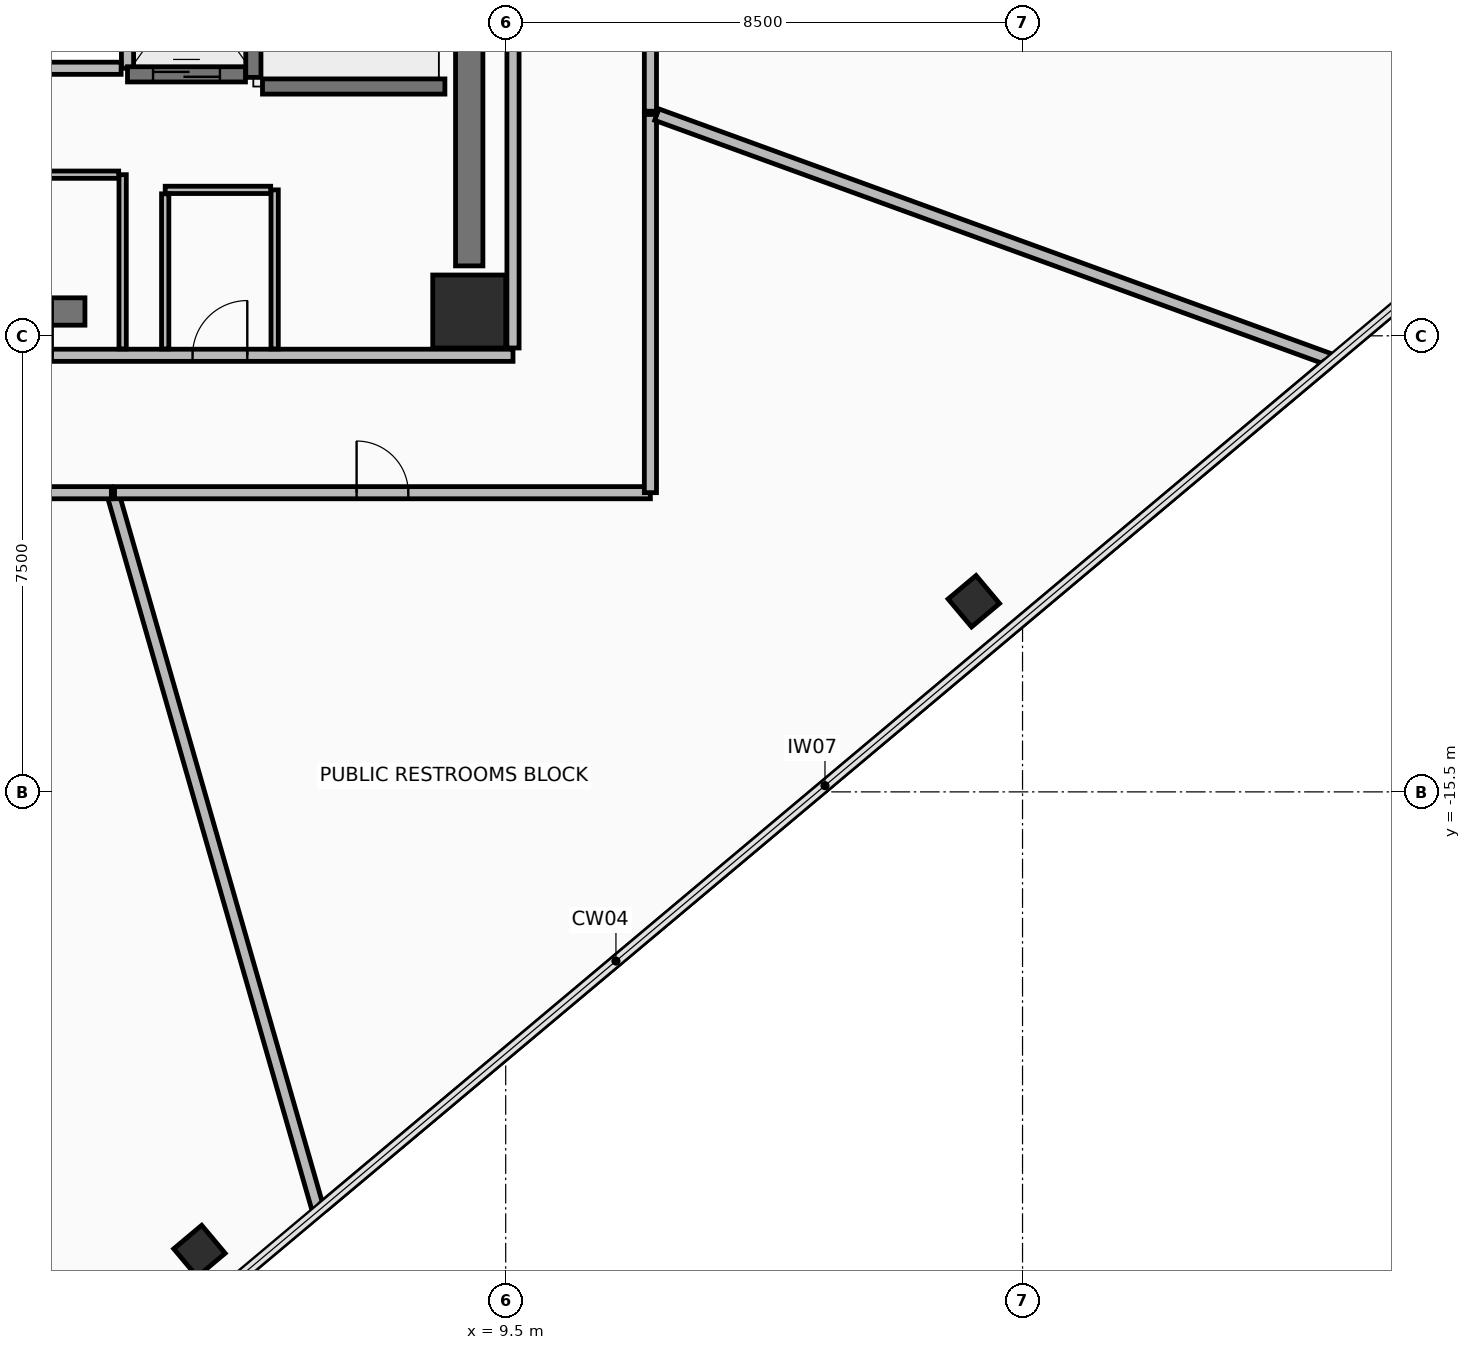
"""IFC4 building model, lengths in metres.
Left out: names, types, materials, properties, quantities, classifications, styles, units other than length and angle.
Written with IfcOpenShell. Run it as: python <this file> out.ifc"""

import sys

from ifc_helpers import new_model, si_unit, direction, frame, frame_2d, origin, origin_2d, place, context, subcontext, project, spatial, rectangle, hollow_rectangle, extrude, element, fill, save


model = new_model("IFC4")
c1 = context("Model", 3, precision=1e-05, world=origin(), true_north=direction((0.0, 1.0)))
c2 = subcontext(c1, "Body", "Model", "MODEL_VIEW")
j1 = project(units=[si_unit("LENGTHUNIT", "METRE"), si_unit("PLANEANGLEUNIT", "RADIAN")], contexts=[c1])
p1 = place(None, origin())
s1 = spatial("IfcSite", under=j1, at=p1, CompositionType="ELEMENT")
p2 = place(p1, origin())
s2 = spatial("IfcBuilding", under=s1, at=p2, CompositionType="ELEMENT")
p3 = place(p2, frame((0.0, 0.0, 188.5)))
s3 = spatial("IfcBuildingStorey", under=s2, at=p3, CompositionType="ELEMENT", Elevation=188.5)
p4 = place(p3, frame((8.9, -7.6, 0.0), z_axis=(0.0, 0.0, 1.0), x_axis=(1.0, 0.0, 0.0)))
e1 = element("IfcColumn", 1, at=p4, inside=s3, PredefinedType="COLUMN", context=c2, shape_type="SweptSolid", body=[
    extrude(rectangle(XDim=1.2, YDim=1.2, at=origin_2d()), origin(), (0.0, 0.0, 1.0), 3.6),
])
for number, where, z_axis, x_axis in (
    (2, (4.463, -23.051, 0.0), (0.0, 0.0, 1.0), (0.766, 0.643, 0.0)),
    (3, (17.198, -12.365, 0.0), (0.0, 0.0, 1.0), (0.766, 0.643, 0.0)),
):
    element("IfcColumn", number, at=place(p3, frame(where, z_axis=z_axis, x_axis=x_axis)), inside=s3, PredefinedType="COLUMN", context=c2, shape_type="SweptSolid", body=[
        extrude(hollow_rectangle(XDim=0.6, YDim=0.6, WallThickness=0.036, at=origin_2d()), origin(), (0.0, 0.0, 1.0), 3.6),
    ])
p5 = place(p3, frame((-2.8, -7.6, 0.0), z_axis=(0.0, 0.0, 1.0), x_axis=(1.0, 0.0, 0.0)))
e4 = element("IfcWall", 4, at=p5, inside=s3, PredefinedType="SHEAR", context=c2, shape_type="SweptSolid", body=[
    extrude(rectangle(XDim=5.38, YDim=0.45, at=frame_2d((2.69, 0.0))), origin(), (0.0, 0.0, 1.0), 3.42),
])
p6 = place(p3, frame((8.9, -6.85, 0.0), z_axis=(0.0, 0.0, 1.0), x_axis=(0.0, 1.0, 0.0)))
e5 = element("IfcWall", 5, at=p6, inside=s3, PredefinedType="SHEAR", context=c2, shape_type="SweptSolid", body=[
    extrude(rectangle(XDim=10.7, YDim=0.45, at=frame_2d((5.35, 0.0))), origin(), (0.0, 0.0, 1.0), 3.42),
])
p7 = place(p3, frame((-9.62, -8.32, 0.0), z_axis=(0.0, 0.0, 1.0), x_axis=(1.0, 0.0, 0.0)))
e6 = element("IfcWall", 6, at=p7, inside=s3, PredefinedType="PARTITIONING", context=c2, shape_type="SweptSolid", body=[
    extrude(rectangle(XDim=19.24, YDim=0.2, at=frame_2d((9.62, 0.0))), origin(), (0.0, 0.0, 1.0), 2.865),
])
p8 = place(p7, frame((7.37, 0.0, 0.0)))
e7 = element("IfcOpeningElement", 7, at=p8, cuts=e6, PredefinedType="OPENING", context=c2, shape_type="SweptSolid", body=[
    extrude(rectangle(XDim=0.9, YDim=2.1, at=frame_2d((0.45, 1.05))), frame((0.0, 0.11, 0.0), z_axis=(0.0, -1.0, 0.0), x_axis=(1.0, 0.0, 0.0)), (0.0, 0.0, 1.0), 0.22),
])
p9 = place(p7, frame((10.77, 0.0, 0.0)))
e8 = element("IfcOpeningElement", 8, at=p9, cuts=e6, PredefinedType="OPENING", context=c2, shape_type="SweptSolid", body=[
    extrude(rectangle(XDim=0.9, YDim=2.1, at=frame_2d((0.45, 1.05))), frame((0.0, 0.11, 0.0), z_axis=(0.0, -1.0, 0.0), x_axis=(1.0, 0.0, 0.0)), (0.0, 0.0, 1.0), 0.22),
])
p10 = place(p7, frame((13.97, 0.0, 0.0)))
e9 = element("IfcOpeningElement", 9, at=p10, cuts=e6, PredefinedType="OPENING", context=c2, shape_type="SweptSolid", body=[
    extrude(rectangle(XDim=0.9, YDim=2.1, at=frame_2d((0.45, 1.05))), frame((0.0, 0.11, 0.0), z_axis=(0.0, -1.0, 0.0), x_axis=(1.0, 0.0, 0.0)), (0.0, 0.0, 1.0), 0.22),
])
p11 = place(p3, frame((9.62, -8.2, 0.0), z_axis=(0.0, 0.0, 1.0), x_axis=(0.0, 1.0, 0.0)))
e10 = element("IfcWall", 10, at=p11, inside=s3, PredefinedType="PARTITIONING", context=c2, shape_type="SweptSolid", body=[
    extrude(rectangle(XDim=16.4, YDim=0.2, at=frame_2d((8.2, 0.0))), origin(), (0.0, 0.0, 1.0), 2.865),
])
p12 = place(p11, frame((12.65, 0.0, 0.0)))
e11 = element("IfcOpeningElement", 11, at=p12, cuts=e10, PredefinedType="OPENING", context=c2, shape_type="SweptSolid", body=[
    extrude(rectangle(XDim=1.1, YDim=2.15, at=frame_2d((0.55, 1.075))), frame((0.0, 0.11, 0.0), z_axis=(0.0, -1.0, 0.0), x_axis=(1.0, 0.0, 0.0)), (0.0, 0.0, 1.0), 0.22),
])
p13 = place(p3, frame((5.35, -3.75, 0.0), z_axis=(0.0, 0.0, 1.0), x_axis=(0.0, 1.0, 0.0)))
e12 = element("IfcWall", 12, at=p13, inside=s3, PredefinedType="SHEAR", context=c2, shape_type="SweptSolid", body=[
    extrude(rectangle(XDim=7.3, YDim=0.25, at=frame_2d((3.65, 0.0))), origin(), (0.0, 0.0, 1.0), 3.42),
])
p14 = place(p3, frame((5.5, -3.9, 0.0), z_axis=(0.0, 0.0, 1.0), x_axis=(1.0, 0.0, 0.0)))
e13 = element("IfcWall", 13, at=p14, inside=s3, PredefinedType="SHEAR", context=c2, shape_type="SweptSolid", body=[
    extrude(rectangle(XDim=3.0, YDim=0.25, at=frame_2d((1.5, 0.0))), origin(), (0.0, 0.0, 1.0), 3.42),
])
p15 = place(p3, frame((3.28, -3.6, 0.0), z_axis=(0.0, 0.0, 1.0), x_axis=(0.0, 1.0, 0.0)))
e14 = element("IfcWall", 14, at=p15, inside=s3, PredefinedType="PARTITIONING", context=c2, shape_type="SweptSolid", body=[
    extrude(rectangle(XDim=1.8, YDim=0.2, at=frame_2d((0.9, 0.0))), origin(), (0.0, 0.0, 1.0), 3.42),
])
p16 = place(p3, frame((1.13, -3.6, 0.0), z_axis=(0.0, 0.0, 1.0), x_axis=(1.0, 0.0, 0.0)))
e15 = element("IfcWall", 15, at=p16, inside=s3, PredefinedType="PARTITIONING", context=c2, shape_type="SweptSolid", body=[
    extrude(rectangle(XDim=2.045, YDim=0.2, at=frame_2d((1.022, 0.0))), origin(), (0.0, 0.0, 1.0), 3.42),
])
p17 = place(p3, frame((3.28, -3.7, 0.0), z_axis=(0.0, 0.0, 1.0), x_axis=(1.0, 0.0, 0.0)))
e16 = element("IfcWall", 16, at=p17, inside=s3, PredefinedType="SHEAR", context=c2, shape_type="SweptSolid", body=[
    extrude(rectangle(XDim=1.94, YDim=0.25, at=frame_2d((0.97, 0.0))), origin(), (0.0, 0.0, 1.0), 3.42),
])
p18 = place(p17, frame((0.42, 0.0, 0.0)))
e17 = element("IfcOpeningElement", 17, at=p18, cuts=e16, PredefinedType="OPENING", context=c2, shape_type="SweptSolid", body=[
    extrude(rectangle(XDim=1.1, YDim=2.2, at=frame_2d((0.55, 1.1))), frame((0.0, 0.135, 0.0), z_axis=(0.0, -1.0, 0.0), x_axis=(1.0, 0.0, 0.0)), (0.0, 0.0, 1.0), 0.27),
])
p19 = place(p3, frame((3.2, -8.215, 0.0), z_axis=(0.0, 0.0, 1.0), x_axis=(0.0, 1.0, 0.0)))
e18 = element("IfcWall", 18, at=p19, inside=s3, PredefinedType="PARTITIONING", context=c2, shape_type="SweptSolid", body=[
    extrude(rectangle(XDim=2.865, YDim=0.12, at=frame_2d((1.433, 0.0))), origin(), (0.0, 0.0, 1.0), 2.715),
])
p20 = place(p3, frame((3.135, -5.35, 0.0), z_axis=(0.0, 0.0, 1.0), x_axis=(-1.0, 0.0, 0.0)))
e19 = element("IfcWall", 19, at=p20, inside=s3, PredefinedType="PARTITIONING", context=c2, shape_type="SweptSolid", body=[
    extrude(rectangle(XDim=3.135, YDim=0.12, at=frame_2d((1.567, 0.0))), origin(), (0.0, 0.0, 1.0), 3.42),
])
p21 = place(p3, frame((5.7, -8.215, 0.0), z_axis=(0.0, 0.0, 1.0), x_axis=(0.0, 1.0, 0.0)))
e20 = element("IfcWall", 20, at=p21, inside=s3, PredefinedType="PARTITIONING", context=c2, shape_type="SweptSolid", body=[
    extrude(rectangle(XDim=2.615, YDim=0.12, at=frame_2d((1.308, 0.0))), origin(), (0.0, 0.0, 1.0), 2.715),
])
p22 = place(p3, frame((5.635, -5.6, 0.0), z_axis=(0.0, 0.0, 1.0), x_axis=(-1.0, 0.0, 0.0)))
e21 = element("IfcWall", 21, at=p22, inside=s3, PredefinedType="PARTITIONING", context=c2, shape_type="SweptSolid", body=[
    extrude(rectangle(XDim=1.735, YDim=0.12, at=frame_2d((0.868, 0.0))), origin(), (0.0, 0.0, 1.0), 3.42),
])
p23 = place(p3, frame((3.9, -5.665, 0.0), z_axis=(0.0, 0.0, 1.0), x_axis=(0.0, -1.0, 0.0)))
e22 = element("IfcWall", 22, at=p23, inside=s3, PredefinedType="PARTITIONING", context=c2, shape_type="SweptSolid", body=[
    extrude(rectangle(XDim=2.55, YDim=0.12, at=frame_2d((1.275, 0.0))), origin(), (0.0, 0.0, 1.0), 2.715),
])
p24 = place(p3, frame((6.42, -22.388, 0.0), z_axis=(0.0, 0.0, 1.0), x_axis=(-0.275623781544, 0.961265588195, 0.0)))
e23 = element("IfcWall", 23, at=p24, inside=s3, PredefinedType="PARTITIONING", context=c2, shape_type="SweptSolid", body=[
    extrude(rectangle(XDim=12.251, YDim=0.2, at=frame_2d((6.125, 0.0))), origin(), (0.0, 0.0, 1.0), 2.715),
])
p25 = place(p3, frame((3.067, -10.58, 0.0), z_axis=(0.0, 0.0, 1.0), x_axis=(1.0, 0.0, 0.0)))
e24 = element("IfcWall", 24, at=p25, inside=s3, PredefinedType="PARTITIONING", context=c2, shape_type="SweptSolid", body=[
    extrude(rectangle(XDim=8.812, YDim=0.2, at=frame_2d((4.406, 0.0))), origin(), (0.0, 0.0, 1.0), 2.865),
])
p26 = place(p25, frame((3.981, 0.0, 0.0)))
e25 = element("IfcOpeningElement", 25, at=p26, cuts=e24, PredefinedType="OPENING", context=c2, shape_type="SweptSolid", body=[
    extrude(rectangle(XDim=0.85, YDim=2.1, at=frame_2d((0.425, 1.05))), frame((0.0, 0.11, 0.0), z_axis=(0.0, -1.0, 0.0), x_axis=(1.0, 0.0, 0.0)), (0.0, 0.0, 1.0), 0.22),
])
p27 = place(p3, frame((11.88, -10.579, 0.0), z_axis=(0.0, 0.0, 1.0), x_axis=(0.0, 1.0, 0.0)))
e26 = element("IfcWall", 26, at=p27, inside=s3, PredefinedType="PARTITIONING", context=c2, shape_type="SweptSolid", body=[
    extrude(rectangle(XDim=6.22, YDim=0.2, at=frame_2d((3.11, 0.0))), origin(), (0.0, 0.0, 1.0), 2.865),
])
p28 = place(p3, frame((11.985, -4.362, 0.0), z_axis=(0.0, 0.0, 1.0), x_axis=(0.939698056563, -0.34200520828, 0.0)))
e27 = element("IfcWall", 27, at=p28, inside=s3, PredefinedType="PARTITIONING", context=c2, shape_type="SweptSolid", body=[
    extrude(rectangle(XDim=11.814, YDim=0.2, at=frame_2d((5.907, 0.0))), origin(), (0.0, 0.0, 1.0), 2.715),
])
p29 = place(p3, frame((22.994, -8.481, 0.0), z_axis=(0.0, 0.0, 1.0), x_axis=(-0.766042878482, -0.642789474343, 0.0)))
e28 = element("IfcWall", 28, at=p29, inside=s3, PredefinedType="PARTITIONING", context=c2, shape_type="SweptSolid", body=[
    extrude(rectangle(XDim=21.521, YDim=0.15, at=frame_2d((10.761, 0.0))), origin(), (0.0, 0.0, 1.0), 3.42),
])
p30 = place(p3, frame((-8.254, -10.58, 0.0), z_axis=(0.0, 0.0, 1.0), x_axis=(1.0, 0.0, 0.0)))
e29 = element("IfcWall", 29, at=p30, inside=s3, PredefinedType="PARTITIONING", context=c2, shape_type="SweptSolid", body=[
    extrude(rectangle(XDim=11.269, YDim=0.2, at=frame_2d((5.634, 0.0))), origin(), (0.0, 0.0, 1.0), 3.42),
])
p31 = place(p30, frame((5.134, 0.0, 0.0)))
e30 = element("IfcOpeningElement", 30, at=p31, cuts=e29, PredefinedType="OPENING", context=c2, shape_type="SweptSolid", body=[
    extrude(rectangle(XDim=1.0, YDim=2.15, at=frame_2d((0.5, 1.075))), frame((0.0, 0.11, 0.0), z_axis=(0.0, -1.0, 0.0), x_axis=(1.0, 0.0, 0.0)), (0.0, 0.0, 1.0), 0.22),
])
p32 = place(p3, frame((11.88, -4.306, 0.0), z_axis=(0.0, 0.0, 1.0), x_axis=(0.0, 1.0, 0.0)))
e31 = element("IfcWall", 31, at=p32, inside=s3, PredefinedType="PARTITIONING", context=c2, shape_type="SweptSolid", body=[
    extrude(rectangle(XDim=9.83, YDim=0.2, at=frame_2d((4.915, 0.0))), origin(), (0.0, 0.0, 1.0), 3.42),
])
p33 = place(p32, frame((4.465, 0.0, 0.0)))
e32 = element("IfcOpeningElement", 32, at=p33, cuts=e31, PredefinedType="OPENING", context=c2, shape_type="SweptSolid", body=[
    extrude(rectangle(XDim=0.9, YDim=2.1, at=frame_2d((0.45, 1.05))), frame((0.0, 0.11, 0.0), z_axis=(0.0, -1.0, 0.0), x_axis=(1.0, 0.0, 0.0)), (0.0, 0.0, 1.0), 0.22),
])
p34 = place(p18, origin())
e33 = element("IfcDoor", 33, at=p34, inside=s3, OperationType="SLIDING_TO_LEFT", PredefinedType="DOOR", context=c2, shape_type="SweptSolid", body=[
    extrude(rectangle(XDim=1.1, YDim=2.2, at=frame_2d((0.55, 1.1))), frame((0.0, 0.025, 0.0), z_axis=(0.0, -1.0, 0.0), x_axis=(1.0, 0.0, 0.0)), (0.0, 0.0, 1.0), 0.05),
])
fill(e17, e33)
p35 = place(p9, frame((0.9, 0.0, 0.0), z_axis=(0.0, 0.0, 1.0), x_axis=(-1.0, 0.0, 0.0)))
e34 = element("IfcDoor", 34, at=p35, inside=s3, OperationType="SINGLE_SWING_LEFT", PredefinedType="DOOR", context=c2, shape_type="SweptSolid", body=[
    extrude(rectangle(XDim=0.9, YDim=2.1, at=frame_2d((0.45, 1.05))), frame((0.0, 0.025, 0.0), z_axis=(0.0, -1.0, 0.0), x_axis=(1.0, 0.0, 0.0)), (0.0, 0.0, 1.0), 0.05),
])
fill(e8, e34)
p36 = place(p10, frame((0.9, 0.0, 0.0), z_axis=(0.0, 0.0, 1.0), x_axis=(-1.0, 0.0, 0.0)))
e35 = element("IfcDoor", 35, at=p36, inside=s3, OperationType="SINGLE_SWING_LEFT", PredefinedType="DOOR", context=c2, shape_type="SweptSolid", body=[
    extrude(rectangle(XDim=0.9, YDim=2.1, at=frame_2d((0.45, 1.05))), frame((0.0, 0.025, 0.0), z_axis=(0.0, -1.0, 0.0), x_axis=(1.0, 0.0, 0.0)), (0.0, 0.0, 1.0), 0.05),
])
fill(e9, e35)
p37 = place(p26, origin())
e36 = element("IfcDoor", 36, at=p37, inside=s3, OperationType="SINGLE_SWING_RIGHT", PredefinedType="DOOR", context=c2, shape_type="SweptSolid", body=[
    extrude(rectangle(XDim=0.85, YDim=2.1, at=frame_2d((0.425, 1.05))), frame((0.0, 0.025, 0.0), z_axis=(0.0, -1.0, 0.0), x_axis=(1.0, 0.0, 0.0)), (0.0, 0.0, 1.0), 0.05),
])
fill(e25, e36)
save(model, sys.argv[1])
